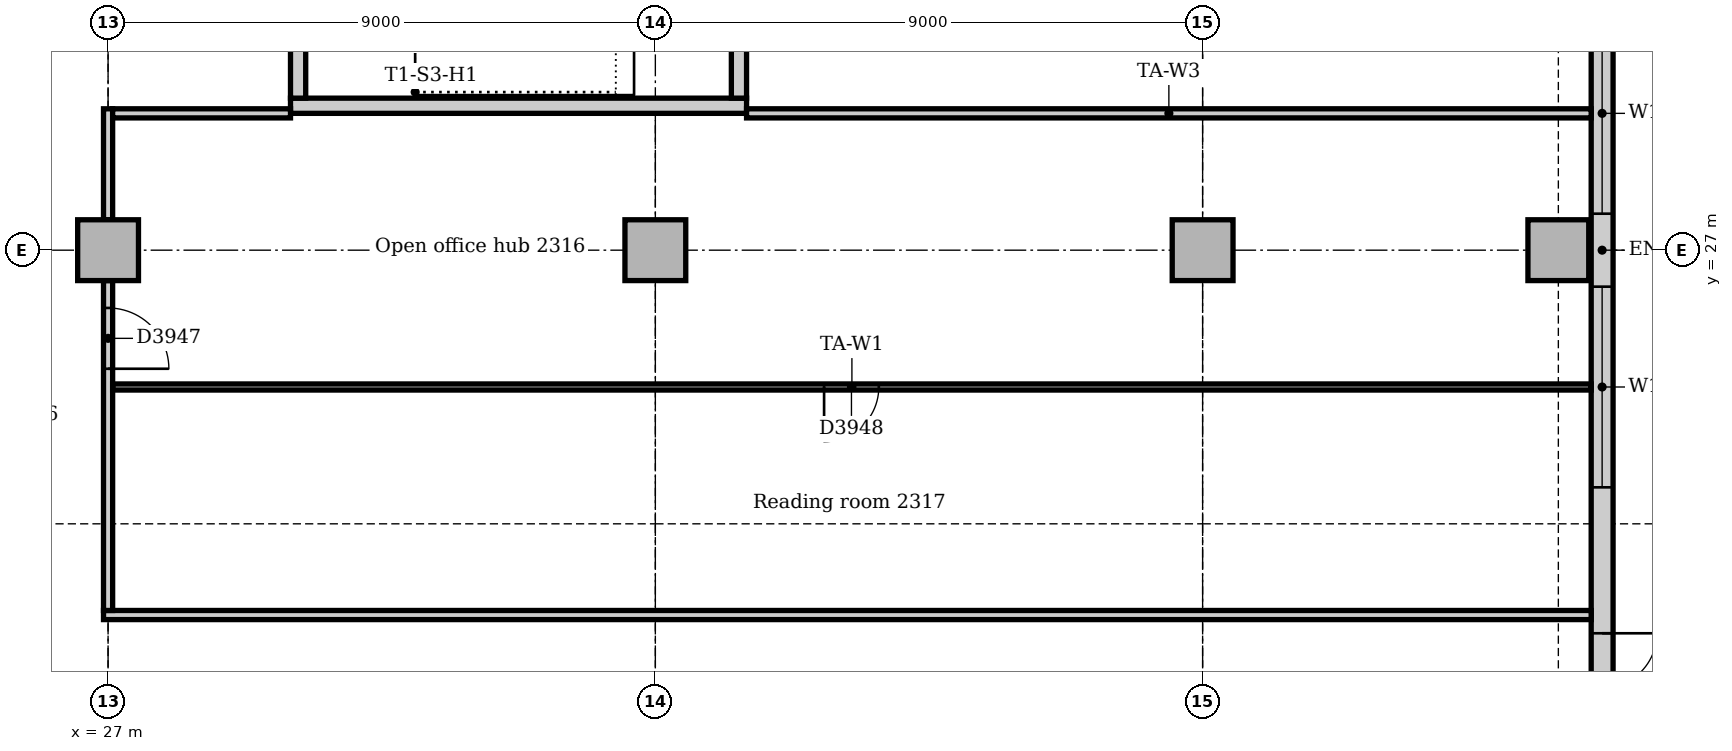
"""IFC4 building model, lengths in metres.
Left out: names, types, materials, properties, quantities, classifications, styles, units other than length and angle.
Written with IfcOpenShell. Run it as: python <this file> out.ifc"""

import sys

from ifc_helpers import new_model, si_unit, direction, frame, frame_2d, origin, origin_2d, place, context, subcontext, project, spatial, rectangle, extrude, element, fill, save


model = new_model("IFC4")
c1 = context("Model", 3, precision=1e-05, world=origin(), true_north=direction((0.0, 1.0)))
c2 = subcontext(c1, "Body", "Model", "MODEL_VIEW")
j1 = project(units=[si_unit("LENGTHUNIT", "METRE"), si_unit("PLANEANGLEUNIT", "RADIAN")], contexts=[c1])
p1 = place(None, origin())
s1 = spatial("IfcSite", under=j1, at=p1, CompositionType="ELEMENT")
p2 = place(p1, origin())
s2 = spatial("IfcBuilding", under=s1, at=p2, CompositionType="ELEMENT")
p3 = place(p2, frame((0.0, 0.0, 100.0)))
s3 = spatial("IfcBuildingStorey", under=s2, at=p3, CompositionType="ELEMENT", Elevation=100.0)
p4 = place(p3, frame((30.0, 29.375, 0.0), z_axis=(0.0, 0.0, 1.0), x_axis=(1.0, 0.0, 0.0)))
e1 = element("IfcWall", 1, at=p4, inside=s3, PredefinedType="SOLIDWALL", context=c2, shape_type="SweptSolid", body=[
    extrude(rectangle(XDim=7.5, YDim=0.25, at=frame_2d((3.75, 0.0))), origin(), (0.0, 0.0, 1.0), 4.0),
])
p5 = place(p3, frame((37.375, 29.5, 0.0), z_axis=(0.0, 0.0, 1.0), x_axis=(0.0, 1.0, 0.0)))
e2 = element("IfcWall", 2, at=p5, inside=s3, PredefinedType="SOLIDWALL", context=c2, shape_type="SweptSolid", body=[
    extrude(rectangle(XDim=4.0, YDim=0.25, at=frame_2d((2.0, 0.0))), origin(), (0.0, 0.0, 1.0), 4.0),
])
p6 = place(p3, frame((30.125, 33.5, 0.0), z_axis=(0.0, 0.0, 1.0), x_axis=(0.0, -1.0, 0.0)))
e3 = element("IfcWall", 3, at=p6, inside=s3, PredefinedType="SOLIDWALL", context=c2, shape_type="SweptSolid", body=[
    extrude(rectangle(XDim=4.0, YDim=0.25, at=frame_2d((2.0, 0.0))), origin(), (0.0, 0.0, 1.0), 4.0),
])
p7 = place(p6, frame((1.5, 0.0, 0.0)))
e4 = element("IfcOpeningElement", 4, at=p7, cuts=e3, PredefinedType="OPENING", context=c2, shape_type="SweptSolid", body=[
    extrude(rectangle(XDim=1.0, YDim=2.1, at=frame_2d((0.5, 1.05))), frame((0.0, 0.135, 0.0), z_axis=(0.0, -1.0, 0.0), x_axis=(1.0, 0.0, 0.0)), (0.0, 0.0, 1.0), 0.27),
])
p8 = place(p3, frame((50.85, 27.0, -0.15), z_axis=(0.0, 0.0, 1.0), x_axis=(1.0, 0.0, 0.0)))
e5 = element("IfcColumn", 5, at=p8, inside=s3, PredefinedType="COLUMN", context=c2, shape_type="SweptSolid", body=[
    extrude(rectangle(XDim=1.0, YDim=1.0, at=origin_2d()), origin(), (0.0, 0.0, 1.0), 4.0),
])
for number, where, z_axis, x_axis in (
    (6, (27.0, 27.0, 0.0), (0.0, 0.0, 1.0), (1.0, 0.0, 0.0)),
    (7, (36.0, 27.0, 0.0), (0.0, 0.0, 1.0), (1.0, 0.0, 0.0)),
    (8, (45.0, 27.0, 0.0), (0.0, 0.0, 1.0), (1.0, 0.0, 0.0)),
):
    element("IfcColumn", number, at=place(p3, frame(where, z_axis=z_axis, x_axis=x_axis)), inside=s3, PredefinedType="COLUMN", context=c2, shape_type="SweptSolid", body=[
        extrude(rectangle(XDim=1.0, YDim=1.0, at=origin_2d()), origin(), (0.0, 0.0, 1.0), 3.85),
    ])
p9 = place(p3, frame((51.57, 14.743, 0.0), z_axis=(0.0, 0.0, 1.0), x_axis=(0.0, 1.0, 0.0)))
e9 = element("IfcWall", 9, at=p9, inside=s3, PredefinedType="STANDARD", context=c2, shape_type="SweptSolid", body=[
    extrude(rectangle(XDim=24.515, YDim=0.36, at=frame_2d((12.257, 0.0))), origin(), (0.0, 0.0, 1.0), 3.85),
])
p10 = place(p9, frame((4.157, 0.0, 0.0)))
e10 = element("IfcOpeningElement", 10, at=p10, cuts=e9, PredefinedType="OPENING", context=c2, shape_type="SweptSolid", body=[
    extrude(rectangle(XDim=1.8, YDim=2.4, at=frame_2d((0.9, 1.2))), frame((0.0, 0.19, 0.0), z_axis=(0.0, -1.0, 0.0), x_axis=(1.0, 0.0, 0.0)), (0.0, 0.0, 1.0), 0.38),
])
p11 = place(p9, frame((8.357, 0.0, 0.9)))
e11 = element("IfcOpeningElement", 11, at=p11, cuts=e9, PredefinedType="OPENING", context=c2, shape_type="SweptSolid", body=[
    extrude(rectangle(XDim=3.3, YDim=1.6, at=frame_2d((1.65, 0.8))), frame((0.0, 0.19, 0.0), z_axis=(0.0, -1.0, 0.0), x_axis=(1.0, 0.0, 0.0)), (0.0, 0.0, 1.0), 0.38),
])
p12 = place(p9, frame((12.857, 0.0, 0.9)))
e12 = element("IfcOpeningElement", 12, at=p12, cuts=e9, PredefinedType="OPENING", context=c2, shape_type="SweptSolid", body=[
    extrude(rectangle(XDim=3.3, YDim=1.6, at=frame_2d((1.65, 0.8))), frame((0.0, 0.19, 0.0), z_axis=(0.0, -1.0, 0.0), x_axis=(1.0, 0.0, 0.0)), (0.0, 0.0, 1.0), 0.38),
])
p13 = place(p9, frame((17.357, 0.0, 0.9)))
e13 = element("IfcOpeningElement", 13, at=p13, cuts=e9, PredefinedType="OPENING", context=c2, shape_type="SweptSolid", body=[
    extrude(rectangle(XDim=3.3, YDim=1.6, at=frame_2d((1.65, 0.8))), frame((0.0, 0.19, 0.0), z_axis=(0.0, -1.0, 0.0), x_axis=(1.0, 0.0, 0.0)), (0.0, 0.0, 1.0), 0.38),
])
p14 = place(p3, frame((26.925, 21.0, 0.0), z_axis=(0.0, 0.0, 1.0), x_axis=(1.0, 0.0, 0.0)))
e14 = element("IfcWall", 14, at=p14, inside=s3, PredefinedType="PARTITIONING", context=c2, shape_type="SweptSolid", body=[
    extrude(rectangle(XDim=24.465, YDim=0.15, at=frame_2d((12.232, 0.0))), origin(), (0.0, 0.0, 1.0), 3.85),
])
p15 = place(p3, frame((27.0, 21.075, 0.0), z_axis=(0.0, 0.0, 1.0), x_axis=(0.0, 1.0, 0.0)))
e15 = element("IfcWall", 15, at=p15, inside=s3, PredefinedType="PARTITIONING", context=c2, shape_type="SweptSolid", body=[
    extrude(rectangle(XDim=5.425, YDim=0.15, at=frame_2d((2.712, 0.0))), origin(), (0.0, 0.0, 1.0), 3.256),
])
p16 = place(p15, frame((3.975, 0.0, 0.0)))
e16 = element("IfcOpeningElement", 16, at=p16, cuts=e15, PredefinedType="OPENING", context=c2, shape_type="SweptSolid", body=[
    extrude(rectangle(XDim=1.0, YDim=2.1, at=frame_2d((0.5, 1.05))), frame((0.0, 0.085, 0.0), z_axis=(0.0, -1.0, 0.0), x_axis=(1.0, 0.0, 0.0)), (0.0, 0.0, 1.0), 0.17),
])
p17 = place(p3, frame((27.0, 27.5, 0.0), z_axis=(0.0, 0.0, 1.0), x_axis=(0.0, 1.0, 0.0)))
e17 = element("IfcWall", 17, at=p17, inside=s3, PredefinedType="PARTITIONING", context=c2, shape_type="SweptSolid", body=[
    extrude(rectangle(XDim=1.825, YDim=0.15, at=frame_2d((0.912, 0.0))), origin(), (0.0, 0.0, 1.0), 3.256),
])
p18 = place(p3, frame((27.075, 29.25, 0.0), z_axis=(0.0, 0.0, 1.0), x_axis=(1.0, 0.0, 0.0)))
e18 = element("IfcWall", 18, at=p18, inside=s3, PredefinedType="PARTITIONING", context=c2, shape_type="SweptSolid", body=[
    extrude(rectangle(XDim=2.925, YDim=0.15, at=frame_2d((1.462, 0.0))), origin(), (0.0, 0.0, 1.0), 3.85),
])
p19 = place(p3, frame((37.5, 29.25, 0.0), z_axis=(0.0, 0.0, 1.0), x_axis=(1.0, 0.0, 0.0)))
e19 = element("IfcWall", 19, at=p19, inside=s3, PredefinedType="PARTITIONING", context=c2, shape_type="SweptSolid", body=[
    extrude(rectangle(XDim=13.89, YDim=0.15, at=frame_2d((6.945, 0.0))), origin(), (0.0, 0.0, 1.0), 3.85),
])
p20 = place(p3, frame((27.075, 24.75, 0.0), z_axis=(0.0, 0.0, 1.0), x_axis=(1.0, 0.0, 0.0)))
e20 = element("IfcWall", 20, at=p20, inside=s3, PredefinedType="PARTITIONING", context=c2, shape_type="SweptSolid", body=[
    extrude(rectangle(XDim=24.315, YDim=0.1, at=frame_2d((12.158, 0.0))), origin(), (0.0, 0.0, 1.0), 3.85),
])
p21 = place(p20, frame((11.7, 0.0, 0.0)))
e21 = element("IfcOpeningElement", 21, at=p21, cuts=e20, PredefinedType="OPENING", context=c2, shape_type="SweptSolid", body=[
    extrude(rectangle(XDim=0.9, YDim=2.1, at=frame_2d((0.45, 1.05))), frame((0.0, 0.06, 0.0), z_axis=(0.0, -1.0, 0.0), x_axis=(1.0, 0.0, 0.0)), (0.0, 0.0, 1.0), 0.12),
])
p22 = place(p10, frame((1.8, 0.0, 0.0), z_axis=(0.0, 0.0, 1.0), x_axis=(-1.0, 0.0, 0.0)))
e22 = element("IfcDoor", 22, at=p22, inside=s3, OperationType="DOUBLE_DOOR_SINGLE_SWING", PredefinedType="DOOR", context=c2, shape_type="SweptSolid", body=[
    extrude(rectangle(XDim=1.8, YDim=2.4, at=frame_2d((0.9, 1.2))), frame((0.0, -0.07, 0.0), z_axis=(0.0, -1.0, 0.0), x_axis=(1.0, 0.0, 0.0)), (0.0, 0.0, 1.0), 0.05),
])
fill(e10, e22)
p23 = place(p11, origin())
e23 = element("IfcWindow", 23, at=p23, inside=s3, PartitioningType="SINGLE_PANEL", PredefinedType="WINDOW", context=c2, shape_type="SweptSolid", body=[
    extrude(rectangle(XDim=3.3, YDim=1.6, at=frame_2d((1.65, 0.8))), frame((0.0, 0.13, 0.0), z_axis=(0.0, -1.0, 0.0), x_axis=(1.0, 0.0, 0.0)), (0.0, 0.0, 1.0), 0.06),
])
fill(e11, e23)
p24 = place(p12, origin())
e24 = element("IfcWindow", 24, at=p24, inside=s3, PartitioningType="SINGLE_PANEL", PredefinedType="WINDOW", context=c2, shape_type="SweptSolid", body=[
    extrude(rectangle(XDim=3.3, YDim=1.6, at=frame_2d((1.65, 0.8))), frame((0.0, 0.13, 0.0), z_axis=(0.0, -1.0, 0.0), x_axis=(1.0, 0.0, 0.0)), (0.0, 0.0, 1.0), 0.06),
])
fill(e12, e24)
p25 = place(p16, frame((1.0, 0.0, 0.0), z_axis=(0.0, 0.0, 1.0), x_axis=(-1.0, 0.0, 0.0)))
e25 = element("IfcDoor", 25, at=p25, inside=s3, OperationType="SINGLE_SWING_RIGHT", PredefinedType="DOOR", context=c2, shape_type="SweptSolid", body=[
    extrude(rectangle(XDim=1.0, YDim=2.1, at=frame_2d((0.5, 1.05))), frame((0.0, 0.025, 0.0), z_axis=(0.0, -1.0, 0.0), x_axis=(1.0, 0.0, 0.0)), (0.0, 0.0, 1.0), 0.05),
])
fill(e16, e25)
p26 = place(p21, frame((0.9, 0.0, 0.0), z_axis=(0.0, 0.0, 1.0), x_axis=(-1.0, 0.0, 0.0)))
e26 = element("IfcDoor", 26, at=p26, inside=s3, OperationType="SINGLE_SWING_RIGHT", PredefinedType="DOOR", context=c2, shape_type="SweptSolid", body=[
    extrude(rectangle(XDim=0.9, YDim=2.1, at=frame_2d((0.45, 1.05))), frame((0.0, 0.025, 0.0), z_axis=(0.0, -1.0, 0.0), x_axis=(1.0, 0.0, 0.0)), (0.0, 0.0, 1.0), 0.05),
])
fill(e21, e26)
save(model, sys.argv[1])
